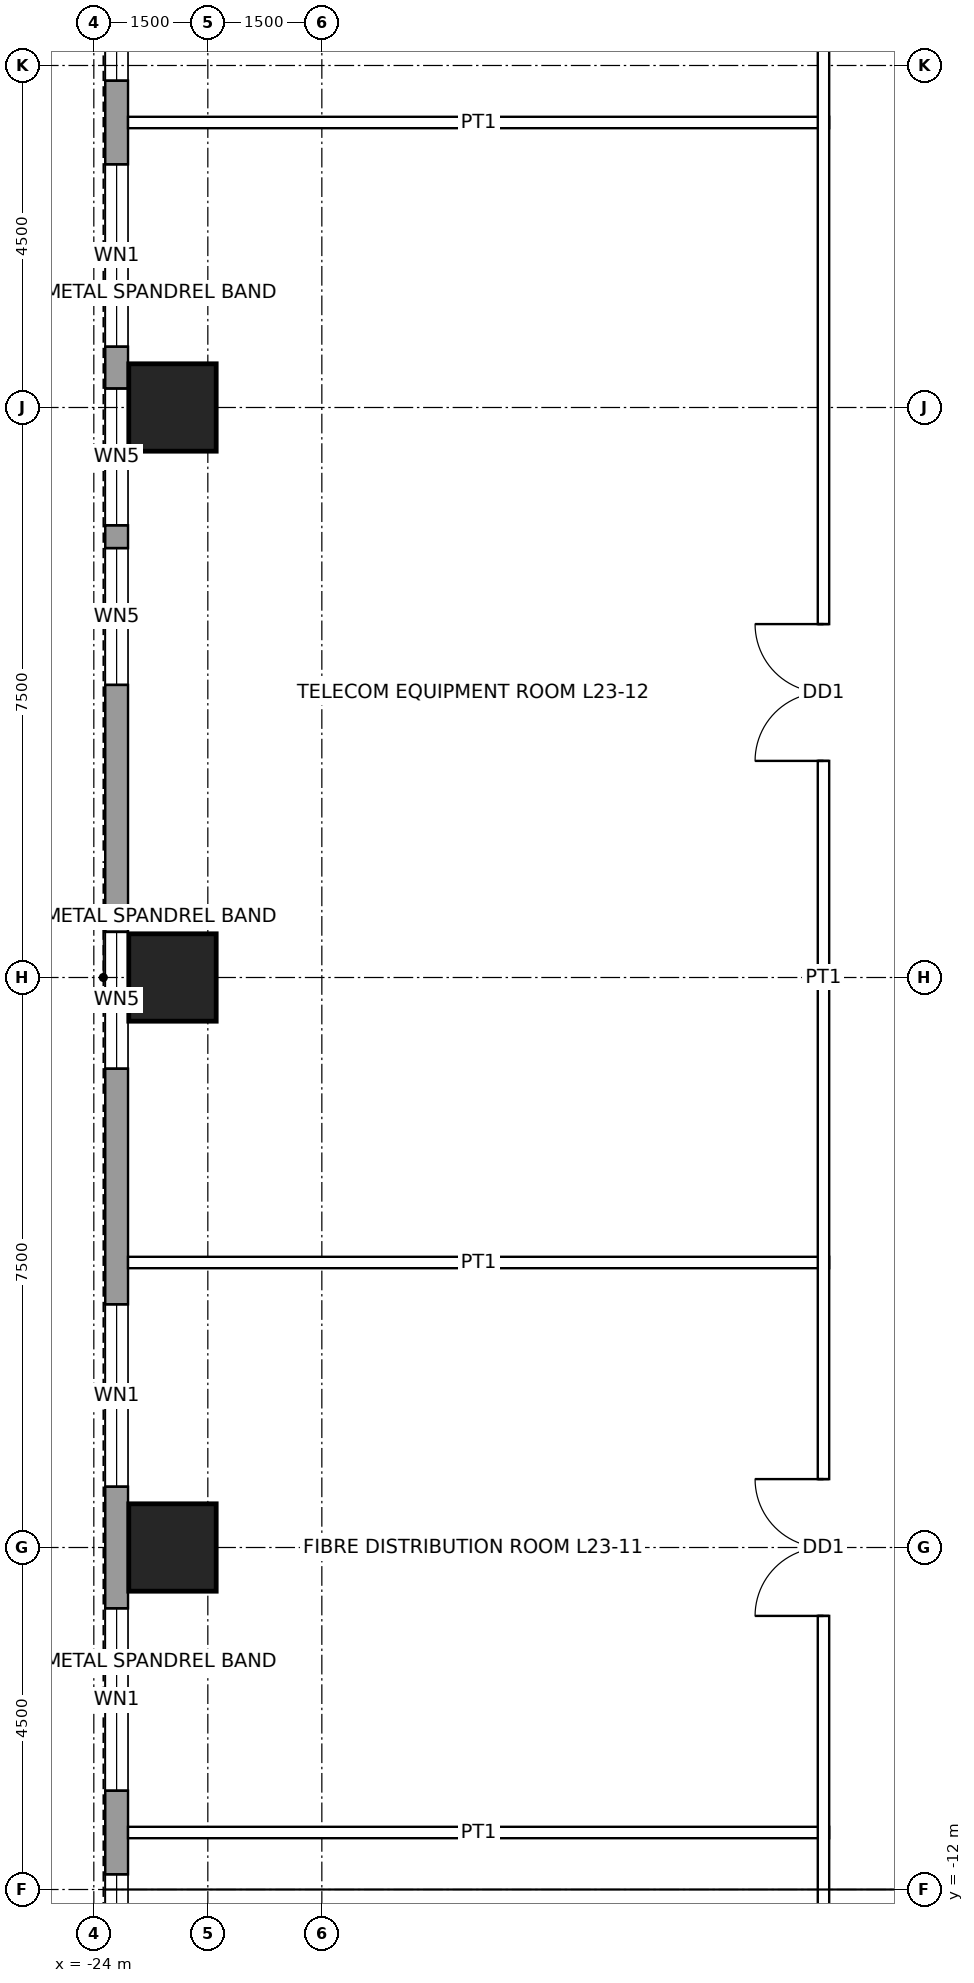
"""IFC4 building model, lengths in metres.
Left out: names, types, materials, properties, quantities, classifications, styles, units other than length and angle.
Written with IfcOpenShell. Run it as: python <this file> out.ifc"""

import sys

from ifc_helpers import new_model, si_unit, direction, frame, frame_2d, origin, origin_2d, place, context, subcontext, project, spatial, rectangle, hollow_rectangle, extrude, element, fill, save


model = new_model("IFC4")
c1 = context("Model", 3, precision=1e-05, world=origin(), true_north=direction((0.0, 1.0)))
c2 = subcontext(c1, "Body", "Model", "MODEL_VIEW")
j1 = project(units=[si_unit("LENGTHUNIT", "METRE"), si_unit("PLANEANGLEUNIT", "RADIAN")], contexts=[c1])
p1 = place(None, origin())
s1 = spatial("IfcSite", under=j1, at=p1, CompositionType="ELEMENT")
p2 = place(p1, origin())
s2 = spatial("IfcBuilding", under=s1, at=p2, CompositionType="ELEMENT")
p3 = place(p2, frame((0.0, 0.0, 117.9)))
s3 = spatial("IfcBuildingStorey", under=s2, at=p3, CompositionType="ELEMENT", Elevation=117.9)
for number, where, z_axis, x_axis in (
    (1, (-22.965, -7.5, 0.0), (0.0, 0.0, 1.0), (1.0, 0.0, 0.0)),
    (2, (-22.965, 0.0, 0.0), (0.0, 0.0, 1.0), (1.0, 0.0, 0.0)),
    (3, (-22.965, 7.5, 0.0), (0.0, 0.0, 1.0), (1.0, 0.0, 0.0)),
):
    element("IfcColumn", number, at=place(p3, frame(where, z_axis=z_axis, x_axis=x_axis)), inside=s3, PredefinedType="COLUMN", context=c2, shape_type="SweptSolid", body=[
        extrude(hollow_rectangle(XDim=1.15, YDim=1.15, WallThickness=0.075, at=origin_2d()), origin(), (0.0, 0.0, 1.0), 4.5),
    ])
p4 = place(p3, frame((-23.7, -16.2, 0.0), z_axis=(0.0, 0.0, 1.0), x_axis=(0.0, 1.0, 0.0)))
e4 = element("IfcWall", 4, at=p4, inside=s3, PredefinedType="SOLIDWALL", context=c2, shape_type="SweptSolid", body=[
    extrude(rectangle(XDim=32.4, YDim=0.3, at=frame_2d((16.2, 0.0))), origin(), (0.0, 0.0, 1.0), 4.3),
])
p5 = place(p4, frame((2.0, 0.0, 1.0)))
e5 = element("IfcOpeningElement", 5, at=p5, cuts=e4, PredefinedType="OPENING", context=c2, shape_type="SweptSolid", body=[
    extrude(rectangle(XDim=2.4, YDim=1.2, at=frame_2d((1.2, 0.6))), frame((0.0, 0.16, 0.0), z_axis=(0.0, -1.0, 0.0), x_axis=(1.0, 0.0, 0.0)), (0.0, 0.0, 1.0), 0.32),
])
p6 = place(p4, frame((5.5, 0.0, 1.0)))
e6 = element("IfcOpeningElement", 6, at=p6, cuts=e4, PredefinedType="OPENING", context=c2, shape_type="SweptSolid", body=[
    extrude(rectangle(XDim=2.4, YDim=1.2, at=frame_2d((1.2, 0.6))), frame((0.0, 0.16, 0.0), z_axis=(0.0, -1.0, 0.0), x_axis=(1.0, 0.0, 0.0)), (0.0, 0.0, 1.0), 0.32),
])
p7 = place(p4, frame((9.5, 0.0, 1.0)))
e7 = element("IfcOpeningElement", 7, at=p7, cuts=e4, PredefinedType="OPENING", context=c2, shape_type="SweptSolid", body=[
    extrude(rectangle(XDim=2.4, YDim=1.2, at=frame_2d((1.2, 0.6))), frame((0.0, 0.16, 0.0), z_axis=(0.0, -1.0, 0.0), x_axis=(1.0, 0.0, 0.0)), (0.0, 0.0, 1.0), 0.32),
])
p8 = place(p4, frame((15.0, 0.0, 1.0)))
e8 = element("IfcOpeningElement", 8, at=p8, cuts=e4, PredefinedType="OPENING", context=c2, shape_type="SweptSolid", body=[
    extrude(rectangle(XDim=1.8, YDim=1.2, at=frame_2d((0.9, 0.6))), frame((0.0, 0.16, 0.0), z_axis=(0.0, -1.0, 0.0), x_axis=(1.0, 0.0, 0.0)), (0.0, 0.0, 1.0), 0.32),
])
p9 = place(p4, frame((20.05, 0.0, 1.0)))
e9 = element("IfcOpeningElement", 9, at=p9, cuts=e4, PredefinedType="OPENING", context=c2, shape_type="SweptSolid", body=[
    extrude(rectangle(XDim=1.8, YDim=1.2, at=frame_2d((0.9, 0.6))), frame((0.0, 0.16, 0.0), z_axis=(0.0, -1.0, 0.0), x_axis=(1.0, 0.0, 0.0)), (0.0, 0.0, 1.0), 0.32),
])
p10 = place(p4, frame((22.15, 0.0, 1.0)))
e10 = element("IfcOpeningElement", 10, at=p10, cuts=e4, PredefinedType="OPENING", context=c2, shape_type="SweptSolid", body=[
    extrude(rectangle(XDim=1.8, YDim=1.2, at=frame_2d((0.9, 0.6))), frame((0.0, 0.16, 0.0), z_axis=(0.0, -1.0, 0.0), x_axis=(1.0, 0.0, 0.0)), (0.0, 0.0, 1.0), 0.32),
])
p11 = place(p4, frame((24.5, 0.0, 1.0)))
e11 = element("IfcOpeningElement", 11, at=p11, cuts=e4, PredefinedType="OPENING", context=c2, shape_type="SweptSolid", body=[
    extrude(rectangle(XDim=2.4, YDim=1.2, at=frame_2d((1.2, 0.6))), frame((0.0, 0.16, 0.0), z_axis=(0.0, -1.0, 0.0), x_axis=(1.0, 0.0, 0.0)), (0.0, 0.0, 1.0), 0.32),
])
p12 = place(p4, frame((28.0, 0.0, 1.0)))
e12 = element("IfcOpeningElement", 12, at=p12, cuts=e4, PredefinedType="OPENING", context=c2, shape_type="SweptSolid", body=[
    extrude(rectangle(XDim=2.4, YDim=1.2, at=frame_2d((1.2, 0.6))), frame((0.0, 0.16, 0.0), z_axis=(0.0, -1.0, 0.0), x_axis=(1.0, 0.0, 0.0)), (0.0, 0.0, 1.0), 0.32),
])
for number, where, z_axis, x_axis in (
    (13, (-23.55, -11.25, 0.0), (0.0, 0.0, 1.0), (1.0, 0.0, 0.0)),
    (14, (-23.55, -3.75, 0.0), (0.0, 0.0, 1.0), (1.0, 0.0, 0.0)),
    (15, (-23.55, 11.25, 0.0), (0.0, 0.0, 1.0), (1.0, 0.0, 0.0)),
):
    element("IfcWall", number, at=place(p3, frame(where, z_axis=z_axis, x_axis=x_axis)), inside=s3, PredefinedType="PARTITIONING", context=c2, shape_type="SweptSolid", body=[
        extrude(rectangle(XDim=9.225, YDim=0.15, at=frame_2d((4.613, 0.0))), origin(), (0.0, 0.0, 1.0), 3.431),
    ])
p13 = place(p3, frame((-14.4, -14.475, 0.0), z_axis=(0.0, 0.0, 1.0), x_axis=(0.0, 1.0, 0.0)))
e16 = element("IfcWall", 16, at=p13, inside=s3, PredefinedType="PARTITIONING", context=c2, shape_type="SweptSolid", body=[
    extrude(rectangle(XDim=28.95, YDim=0.15, at=frame_2d((14.475, 0.0))), origin(), (0.0, 0.0, 1.0), 4.3),
])
p14 = place(p13, frame((6.075, 0.0, 0.0)))
e17 = element("IfcOpeningElement", 17, at=p14, cuts=e16, PredefinedType="OPENING", context=c2, shape_type="SweptSolid", body=[
    extrude(rectangle(XDim=1.8, YDim=2.4, at=frame_2d((0.9, 1.2))), frame((0.0, 0.085, 0.0), z_axis=(0.0, -1.0, 0.0), x_axis=(1.0, 0.0, 0.0)), (0.0, 0.0, 1.0), 0.17),
])
p15 = place(p13, frame((17.325, 0.0, 0.0)))
e18 = element("IfcOpeningElement", 18, at=p15, cuts=e16, PredefinedType="OPENING", context=c2, shape_type="SweptSolid", body=[
    extrude(rectangle(XDim=1.8, YDim=2.4, at=frame_2d((0.9, 1.2))), frame((0.0, 0.085, 0.0), z_axis=(0.0, -1.0, 0.0), x_axis=(1.0, 0.0, 0.0)), (0.0, 0.0, 1.0), 0.17),
])
p16 = place(p5, origin())
e19 = element("IfcWindow", 19, at=p16, inside=s3, PartitioningType="SINGLE_PANEL", PredefinedType="WINDOW", context=c2, shape_type="SweptSolid", body=[
    extrude(rectangle(XDim=2.4, YDim=1.2, at=frame_2d((1.2, 0.6))), frame((0.0, 0.03, 0.0), z_axis=(0.0, -1.0, 0.0), x_axis=(1.0, 0.0, 0.0)), (0.0, 0.0, 1.0), 0.06),
])
fill(e5, e19)
p17 = place(p6, origin())
e20 = element("IfcWindow", 20, at=p17, inside=s3, PartitioningType="SINGLE_PANEL", PredefinedType="WINDOW", context=c2, shape_type="SweptSolid", body=[
    extrude(rectangle(XDim=2.4, YDim=1.2, at=frame_2d((1.2, 0.6))), frame((0.0, 0.03, 0.0), z_axis=(0.0, -1.0, 0.0), x_axis=(1.0, 0.0, 0.0)), (0.0, 0.0, 1.0), 0.06),
])
fill(e6, e20)
p18 = place(p7, origin())
e21 = element("IfcWindow", 21, at=p18, inside=s3, PartitioningType="SINGLE_PANEL", PredefinedType="WINDOW", context=c2, shape_type="SweptSolid", body=[
    extrude(rectangle(XDim=2.4, YDim=1.2, at=frame_2d((1.2, 0.6))), frame((0.0, 0.03, 0.0), z_axis=(0.0, -1.0, 0.0), x_axis=(1.0, 0.0, 0.0)), (0.0, 0.0, 1.0), 0.06),
])
fill(e7, e21)
p19 = place(p8, origin())
e22 = element("IfcWindow", 22, at=p19, inside=s3, PartitioningType="SINGLE_PANEL", PredefinedType="WINDOW", context=c2, shape_type="SweptSolid", body=[
    extrude(rectangle(XDim=1.8, YDim=1.2, at=frame_2d((0.9, 0.6))), frame((0.0, 0.03, 0.0), z_axis=(0.0, -1.0, 0.0), x_axis=(1.0, 0.0, 0.0)), (0.0, 0.0, 1.0), 0.06),
])
fill(e8, e22)
p20 = place(p9, origin())
e23 = element("IfcWindow", 23, at=p20, inside=s3, PartitioningType="SINGLE_PANEL", PredefinedType="WINDOW", context=c2, shape_type="SweptSolid", body=[
    extrude(rectangle(XDim=1.8, YDim=1.2, at=frame_2d((0.9, 0.6))), frame((0.0, 0.03, 0.0), z_axis=(0.0, -1.0, 0.0), x_axis=(1.0, 0.0, 0.0)), (0.0, 0.0, 1.0), 0.06),
])
fill(e9, e23)
p21 = place(p10, origin())
e24 = element("IfcWindow", 24, at=p21, inside=s3, PartitioningType="SINGLE_PANEL", PredefinedType="WINDOW", context=c2, shape_type="SweptSolid", body=[
    extrude(rectangle(XDim=1.8, YDim=1.2, at=frame_2d((0.9, 0.6))), frame((0.0, 0.03, 0.0), z_axis=(0.0, -1.0, 0.0), x_axis=(1.0, 0.0, 0.0)), (0.0, 0.0, 1.0), 0.06),
])
fill(e10, e24)
p22 = place(p11, origin())
e25 = element("IfcWindow", 25, at=p22, inside=s3, PartitioningType="SINGLE_PANEL", PredefinedType="WINDOW", context=c2, shape_type="SweptSolid", body=[
    extrude(rectangle(XDim=2.4, YDim=1.2, at=frame_2d((1.2, 0.6))), frame((0.0, 0.03, 0.0), z_axis=(0.0, -1.0, 0.0), x_axis=(1.0, 0.0, 0.0)), (0.0, 0.0, 1.0), 0.06),
])
fill(e11, e25)
p23 = place(p12, origin())
e26 = element("IfcWindow", 26, at=p23, inside=s3, PartitioningType="SINGLE_PANEL", PredefinedType="WINDOW", context=c2, shape_type="SweptSolid", body=[
    extrude(rectangle(XDim=2.4, YDim=1.2, at=frame_2d((1.2, 0.6))), frame((0.0, 0.03, 0.0), z_axis=(0.0, -1.0, 0.0), x_axis=(1.0, 0.0, 0.0)), (0.0, 0.0, 1.0), 0.06),
])
fill(e12, e26)
p24 = place(p14, origin())
e27 = element("IfcDoor", 27, at=p24, inside=s3, OperationType="DOUBLE_DOOR_SINGLE_SWING", PredefinedType="DOOR", context=c2, shape_type="SweptSolid", body=[
    extrude(rectangle(XDim=1.8, YDim=2.4, at=frame_2d((0.9, 1.2))), frame((0.0, 0.025, 0.0), z_axis=(0.0, -1.0, 0.0), x_axis=(1.0, 0.0, 0.0)), (0.0, 0.0, 1.0), 0.05),
])
fill(e17, e27)
p25 = place(p15, origin())
e28 = element("IfcDoor", 28, at=p25, inside=s3, OperationType="DOUBLE_DOOR_SINGLE_SWING", PredefinedType="DOOR", context=c2, shape_type="SweptSolid", body=[
    extrude(rectangle(XDim=1.8, YDim=2.4, at=frame_2d((0.9, 1.2))), frame((0.0, 0.025, 0.0), z_axis=(0.0, -1.0, 0.0), x_axis=(1.0, 0.0, 0.0)), (0.0, 0.0, 1.0), 0.05),
])
fill(e18, e28)
save(model, sys.argv[1])
